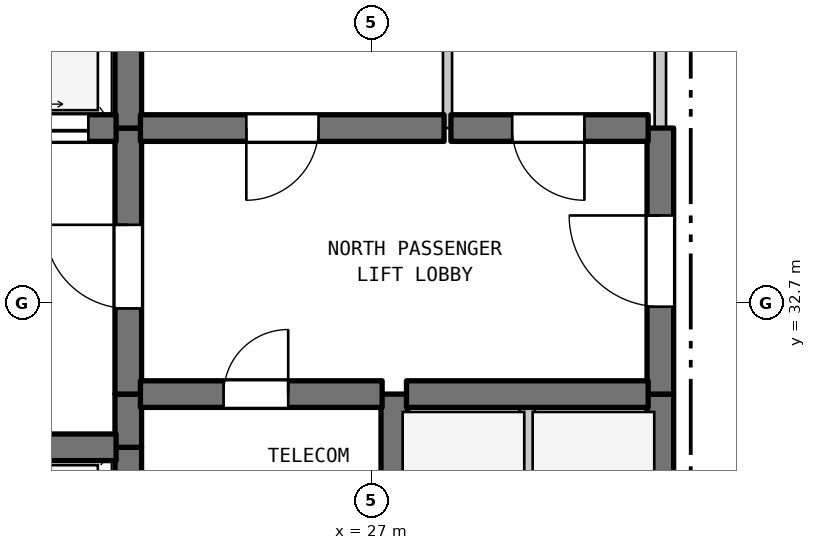
"""IFC4 building model, lengths in metres.
Left out: names, types, materials, properties, quantities, classifications, styles, units other than length and angle.
Written with IfcOpenShell. Run it as: python <this file> out.ifc"""

import sys

from ifc_helpers import new_model, si_unit, direction, frame, frame_2d, origin, place, context, subcontext, project, spatial, rectangle, extrude, element, fill, save


model = new_model("IFC4")
c1 = context("Model", 3, precision=1e-05, world=origin(), true_north=direction((0.0, 1.0)))
c2 = subcontext(c1, "Body", "Model", "MODEL_VIEW")
j1 = project(units=[si_unit("LENGTHUNIT", "METRE"), si_unit("PLANEANGLEUNIT", "RADIAN")], contexts=[c1])
p1 = place(None, origin())
s1 = spatial("IfcSite", under=j1, at=p1, CompositionType="ELEMENT")
p2 = place(p1, origin())
s2 = spatial("IfcBuilding", under=s1, at=p2, CompositionType="ELEMENT")
p3 = place(p2, frame((0.0, 0.0, 203.2)))
s3 = spatial("IfcBuildingStorey", under=s2, at=p3, CompositionType="ELEMENT", Elevation=203.2)
p4 = place(p3, frame((23.8, 29.5, 0.0), z_axis=(0.0, 0.0, 1.0), x_axis=(0.0, 1.0, 0.0)))
e1 = element("IfcWall", 1, at=p4, inside=s3, PredefinedType="SHEAR", context=c2, shape_type="SweptSolid", body=[
    extrude(rectangle(XDim=1.3, YDim=0.35, at=frame_2d((0.65, 0.0))), origin(), (0.0, 0.0, 1.0), 3.39),
])
p5 = place(p3, frame((23.8, 30.8, 0.0), z_axis=(0.0, 0.0, 1.0), x_axis=(0.0, 1.0, 0.0)))
e2 = element("IfcWall", 2, at=p5, inside=s3, PredefinedType="SHEAR", context=c2, shape_type="SweptSolid", body=[
    extrude(rectangle(XDim=0.7, YDim=0.35, at=frame_2d((0.35, 0.0))), origin(), (0.0, 0.0, 1.0), 3.39),
])
p6 = place(p3, frame((23.8, 31.5, 0.0), z_axis=(0.0, 0.0, 1.0), x_axis=(0.0, 1.0, 0.0)))
e3 = element("IfcWall", 3, at=p6, inside=s3, PredefinedType="SHEAR", context=c2, shape_type="SweptSolid", body=[
    extrude(rectangle(XDim=3.5, YDim=0.35, at=frame_2d((1.75, 0.0))), origin(), (0.0, 0.0, 1.0), 3.39),
])
p7 = place(p6, frame((1.127, 0.0, 0.0)))
e4 = element("IfcOpeningElement", 4, at=p7, cuts=e3, PredefinedType="OPENING", context=c2, shape_type="SweptSolid", body=[
    extrude(rectangle(XDim=1.1, YDim=2.15, at=frame_2d((0.55, 1.075))), frame((0.0, 0.185, 0.0), z_axis=(0.0, -1.0, 0.0), x_axis=(1.0, 0.0, 0.0)), (0.0, 0.0, 1.0), 0.37),
])
p8 = place(p3, frame((23.8, 35.0, 0.0), z_axis=(0.0, 0.0, 1.0), x_axis=(0.0, 1.0, 0.0)))
e5 = element("IfcWall", 5, at=p8, inside=s3, PredefinedType="SHEAR", context=c2, shape_type="SweptSolid", body=[
    extrude(rectangle(XDim=2.9, YDim=0.35, at=frame_2d((1.45, 0.0))), origin(), (0.0, 0.0, 1.0), 3.39),
])
p9 = place(p3, frame((27.3, 29.5, 0.0), z_axis=(0.0, 0.0, 1.0), x_axis=(0.0, 1.0, 0.0)))
e6 = element("IfcWall", 6, at=p9, inside=s3, PredefinedType="SHEAR", context=c2, shape_type="SweptSolid", body=[
    extrude(rectangle(XDim=2.0, YDim=0.35, at=frame_2d((1.0, 0.0))), origin(), (0.0, 0.0, 1.0), 3.39),
])
p10 = place(p3, frame((28.0, 35.0, 0.0), z_axis=(0.0, 0.0, 1.0), x_axis=(0.0, 1.0, 0.0)))
e7 = element("IfcWall", 7, at=p10, inside=s3, PredefinedType="PARTITIONING", context=c2, shape_type="SweptSolid", body=[
    extrude(rectangle(XDim=2.9, YDim=0.12, at=frame_2d((1.45, 0.0))), origin(), (0.0, 0.0, 1.0), 3.39),
])
p11 = place(p3, frame((29.05, 28.9, 0.0), z_axis=(0.0, 0.0, 1.0), x_axis=(0.0, 1.0, 0.0)))
e8 = element("IfcWall", 8, at=p11, inside=s3, PredefinedType="STANDARD", context=c2, shape_type="SweptSolid", body=[
    extrude(rectangle(XDim=2.6, YDim=0.2, at=frame_2d((1.3, 0.0))), origin(), (0.0, 0.0, 1.0), 3.39),
])
p12 = place(p3, frame((30.8, 28.9, 0.0), z_axis=(0.0, 0.0, 1.0), x_axis=(0.0, 1.0, 0.0)))
e9 = element("IfcWall", 9, at=p12, inside=s3, PredefinedType="SHEAR", context=c2, shape_type="SweptSolid", body=[
    extrude(rectangle(XDim=2.6, YDim=0.35, at=frame_2d((1.3, 0.0))), origin(), (0.0, 0.0, 1.0), 3.39),
])
p13 = place(p3, frame((30.8, 31.5, 0.0), z_axis=(0.0, 0.0, 1.0), x_axis=(0.0, 1.0, 0.0)))
e10 = element("IfcWall", 10, at=p13, inside=s3, PredefinedType="SHEAR", context=c2, shape_type="SweptSolid", body=[
    extrude(rectangle(XDim=3.5, YDim=0.35, at=frame_2d((1.75, 0.0))), origin(), (0.0, 0.0, 1.0), 3.39),
])
p14 = place(p13, frame((1.15, 0.0, 0.0)))
e11 = element("IfcOpeningElement", 11, at=p14, cuts=e10, PredefinedType="OPENING", context=c2, shape_type="SweptSolid", body=[
    extrude(rectangle(XDim=1.2, YDim=2.2, at=frame_2d((0.6, 1.1))), frame((0.0, 0.185, 0.0), z_axis=(0.0, -1.0, 0.0), x_axis=(1.0, 0.0, 0.0)), (0.0, 0.0, 1.0), 0.37),
])
p15 = place(p3, frame((30.8, 35.0, 0.0), z_axis=(0.0, 0.0, 1.0), x_axis=(0.0, 1.0, 0.0)))
e12 = element("IfcWall", 12, at=p15, inside=s3, PredefinedType="STANDARD", context=c2, shape_type="SweptSolid", body=[
    extrude(rectangle(XDim=2.9, YDim=0.15, at=frame_2d((1.45, 0.0))), origin(), (0.0, 0.0, 1.0), 3.39),
])
p16 = place(p3, frame((19.16, 30.8, 0.0), z_axis=(0.0, 0.0, 1.0), x_axis=(1.0, 0.0, 0.0)))
e13 = element("IfcWall", 13, at=p16, inside=s3, PredefinedType="SHEAR", context=c2, shape_type="SweptSolid", body=[
    extrude(rectangle(XDim=4.48, YDim=0.35, at=frame_2d((2.24, 0.0))), origin(), (0.0, 0.0, 1.0), 3.39),
])
p17 = place(p3, frame((23.96, 31.5, 0.0), z_axis=(0.0, 0.0, 1.0), x_axis=(1.0, 0.0, 0.0)))
e14 = element("IfcWall", 14, at=p17, inside=s3, PredefinedType="SHEAR", context=c2, shape_type="SweptSolid", body=[
    extrude(rectangle(XDim=3.18, YDim=0.35, at=frame_2d((1.59, 0.0))), origin(), (0.0, 0.0, 1.0), 3.39),
])
p18 = place(p17, frame((1.094, 0.0, 0.0)))
e15 = element("IfcOpeningElement", 15, at=p18, cuts=e14, PredefinedType="OPENING", context=c2, shape_type="SweptSolid", body=[
    extrude(rectangle(XDim=0.85, YDim=2.1, at=frame_2d((0.425, 1.05))), frame((0.0, 0.185, 0.0), z_axis=(0.0, -1.0, 0.0), x_axis=(1.0, 0.0, 0.0)), (0.0, 0.0, 1.0), 0.37),
])
p19 = place(p3, frame((27.46, 31.5, 0.0), z_axis=(0.0, 0.0, 1.0), x_axis=(1.0, 0.0, 0.0)))
e16 = element("IfcWall", 16, at=p19, inside=s3, PredefinedType="SHEAR", context=c2, shape_type="SweptSolid", body=[
    extrude(rectangle(XDim=3.18, YDim=0.35, at=frame_2d((1.59, 0.0))), origin(), (0.0, 0.0, 1.0), 3.39),
])
p20 = place(p3, frame((19.16, 35.0, 0.0), z_axis=(0.0, 0.0, 1.0), x_axis=(1.0, 0.0, 0.0)))
e17 = element("IfcWall", 17, at=p20, inside=s3, PredefinedType="SHEAR", context=c2, shape_type="SweptSolid", body=[
    extrude(rectangle(XDim=4.48, YDim=0.35, at=frame_2d((2.24, 0.0))), origin(), (0.0, 0.0, 1.0), 3.39),
])
p21 = place(p20, frame((0.365, 0.0, 0.0)))
e18 = element("IfcOpeningElement", 18, at=p21, cuts=e17, PredefinedType="OPENING", context=c2, shape_type="SweptSolid", body=[
    extrude(rectangle(XDim=1.35, YDim=2.2, at=frame_2d((0.675, 1.1))), frame((0.0, 0.185, 0.0), z_axis=(0.0, -1.0, 0.0), x_axis=(1.0, 0.0, 0.0)), (0.0, 0.0, 1.0), 0.37),
])
p22 = place(p20, frame((2.765, 0.0, 0.0)))
e19 = element("IfcOpeningElement", 19, at=p22, cuts=e17, PredefinedType="OPENING", context=c2, shape_type="SweptSolid", body=[
    extrude(rectangle(XDim=1.35, YDim=2.2, at=frame_2d((0.675, 1.1))), frame((0.0, 0.185, 0.0), z_axis=(0.0, -1.0, 0.0), x_axis=(1.0, 0.0, 0.0)), (0.0, 0.0, 1.0), 0.37),
])
p23 = place(p3, frame((23.96, 35.0, 0.0), z_axis=(0.0, 0.0, 1.0), x_axis=(1.0, 0.0, 0.0)))
e20 = element("IfcWall", 20, at=p23, inside=s3, PredefinedType="SHEAR", context=c2, shape_type="SweptSolid", body=[
    extrude(rectangle(XDim=3.995, YDim=0.35, at=frame_2d((1.998, 0.0))), origin(), (0.0, 0.0, 1.0), 3.39),
])
p24 = place(p23, frame((1.393, 0.0, 0.0)))
e21 = element("IfcOpeningElement", 21, at=p24, cuts=e20, PredefinedType="OPENING", context=c2, shape_type="SweptSolid", body=[
    extrude(rectangle(XDim=0.95, YDim=2.15, at=frame_2d((0.475, 1.075))), frame((0.0, 0.185, 0.0), z_axis=(0.0, -1.0, 0.0), x_axis=(1.0, 0.0, 0.0)), (0.0, 0.0, 1.0), 0.37),
])
p25 = place(p3, frame((28.045, 35.0, 0.0), z_axis=(0.0, 0.0, 1.0), x_axis=(1.0, 0.0, 0.0)))
e22 = element("IfcWall", 22, at=p25, inside=s3, PredefinedType="SHEAR", context=c2, shape_type="SweptSolid", body=[
    extrude(rectangle(XDim=2.595, YDim=0.35, at=frame_2d((1.297, 0.0))), origin(), (0.0, 0.0, 1.0), 3.39),
])
p26 = place(p25, frame((0.806, 0.0, 0.0)))
e23 = element("IfcOpeningElement", 23, at=p26, cuts=e22, PredefinedType="OPENING", context=c2, shape_type="SweptSolid", body=[
    extrude(rectangle(XDim=0.95, YDim=2.15, at=frame_2d((0.475, 1.075))), frame((0.0, 0.185, 0.0), z_axis=(0.0, -1.0, 0.0), x_axis=(1.0, 0.0, 0.0)), (0.0, 0.0, 1.0), 0.37),
])
p27 = place(p7, origin())
e24 = element("IfcDoor", 24, at=p27, inside=s3, OperationType="SINGLE_SWING_RIGHT", PredefinedType="DOOR", context=c2, shape_type="SweptSolid", body=[
    extrude(rectangle(XDim=1.1, YDim=2.15, at=frame_2d((0.55, 1.075))), frame((0.0, 0.025, 0.0), z_axis=(0.0, -1.0, 0.0), x_axis=(1.0, 0.0, 0.0)), (0.0, 0.0, 1.0), 0.05),
])
fill(e4, e24)
p28 = place(p14, origin())
e25 = element("IfcDoor", 25, at=p28, inside=s3, OperationType="SINGLE_SWING_RIGHT", PredefinedType="DOOR", context=c2, shape_type="SweptSolid", body=[
    extrude(rectangle(XDim=1.2, YDim=2.2, at=frame_2d((0.6, 1.1))), frame((0.0, 0.025, 0.0), z_axis=(0.0, -1.0, 0.0), x_axis=(1.0, 0.0, 0.0)), (0.0, 0.0, 1.0), 0.05),
])
fill(e11, e25)
p29 = place(p18, origin())
e26 = element("IfcDoor", 26, at=p29, inside=s3, OperationType="SINGLE_SWING_RIGHT", PredefinedType="DOOR", context=c2, shape_type="SweptSolid", body=[
    extrude(rectangle(XDim=0.85, YDim=2.1, at=frame_2d((0.425, 1.05))), frame((0.0, 0.025, 0.0), z_axis=(0.0, -1.0, 0.0), x_axis=(1.0, 0.0, 0.0)), (0.0, 0.0, 1.0), 0.05),
])
fill(e15, e26)
p30 = place(p22, origin())
e27 = element("IfcDoor", 27, at=p30, inside=s3, OperationType="DOUBLE_DOOR_SLIDING", PredefinedType="DOOR", context=c2, shape_type="SweptSolid", body=[
    extrude(rectangle(XDim=1.35, YDim=2.2, at=frame_2d((0.675, 1.1))), frame((0.0, 0.025, 0.0), z_axis=(0.0, -1.0, 0.0), x_axis=(1.0, 0.0, 0.0)), (0.0, 0.0, 1.0), 0.05),
])
fill(e19, e27)
p31 = place(p24, frame((0.95, 0.0, 0.0), z_axis=(0.0, 0.0, 1.0), x_axis=(-1.0, 0.0, 0.0)))
e28 = element("IfcDoor", 28, at=p31, inside=s3, OperationType="SINGLE_SWING_LEFT", PredefinedType="DOOR", context=c2, shape_type="SweptSolid", body=[
    extrude(rectangle(XDim=0.95, YDim=2.15, at=frame_2d((0.475, 1.075))), frame((0.0, 0.025, 0.0), z_axis=(0.0, -1.0, 0.0), x_axis=(1.0, 0.0, 0.0)), (0.0, 0.0, 1.0), 0.05),
])
fill(e21, e28)
p32 = place(p26, frame((0.95, 0.0, 0.0), z_axis=(0.0, 0.0, 1.0), x_axis=(-1.0, 0.0, 0.0)))
e29 = element("IfcDoor", 29, at=p32, inside=s3, OperationType="SINGLE_SWING_RIGHT", PredefinedType="DOOR", context=c2, shape_type="SweptSolid", body=[
    extrude(rectangle(XDim=0.95, YDim=2.15, at=frame_2d((0.475, 1.075))), frame((0.0, 0.025, 0.0), z_axis=(0.0, -1.0, 0.0), x_axis=(1.0, 0.0, 0.0)), (0.0, 0.0, 1.0), 0.05),
])
fill(e23, e29)
save(model, sys.argv[1])
